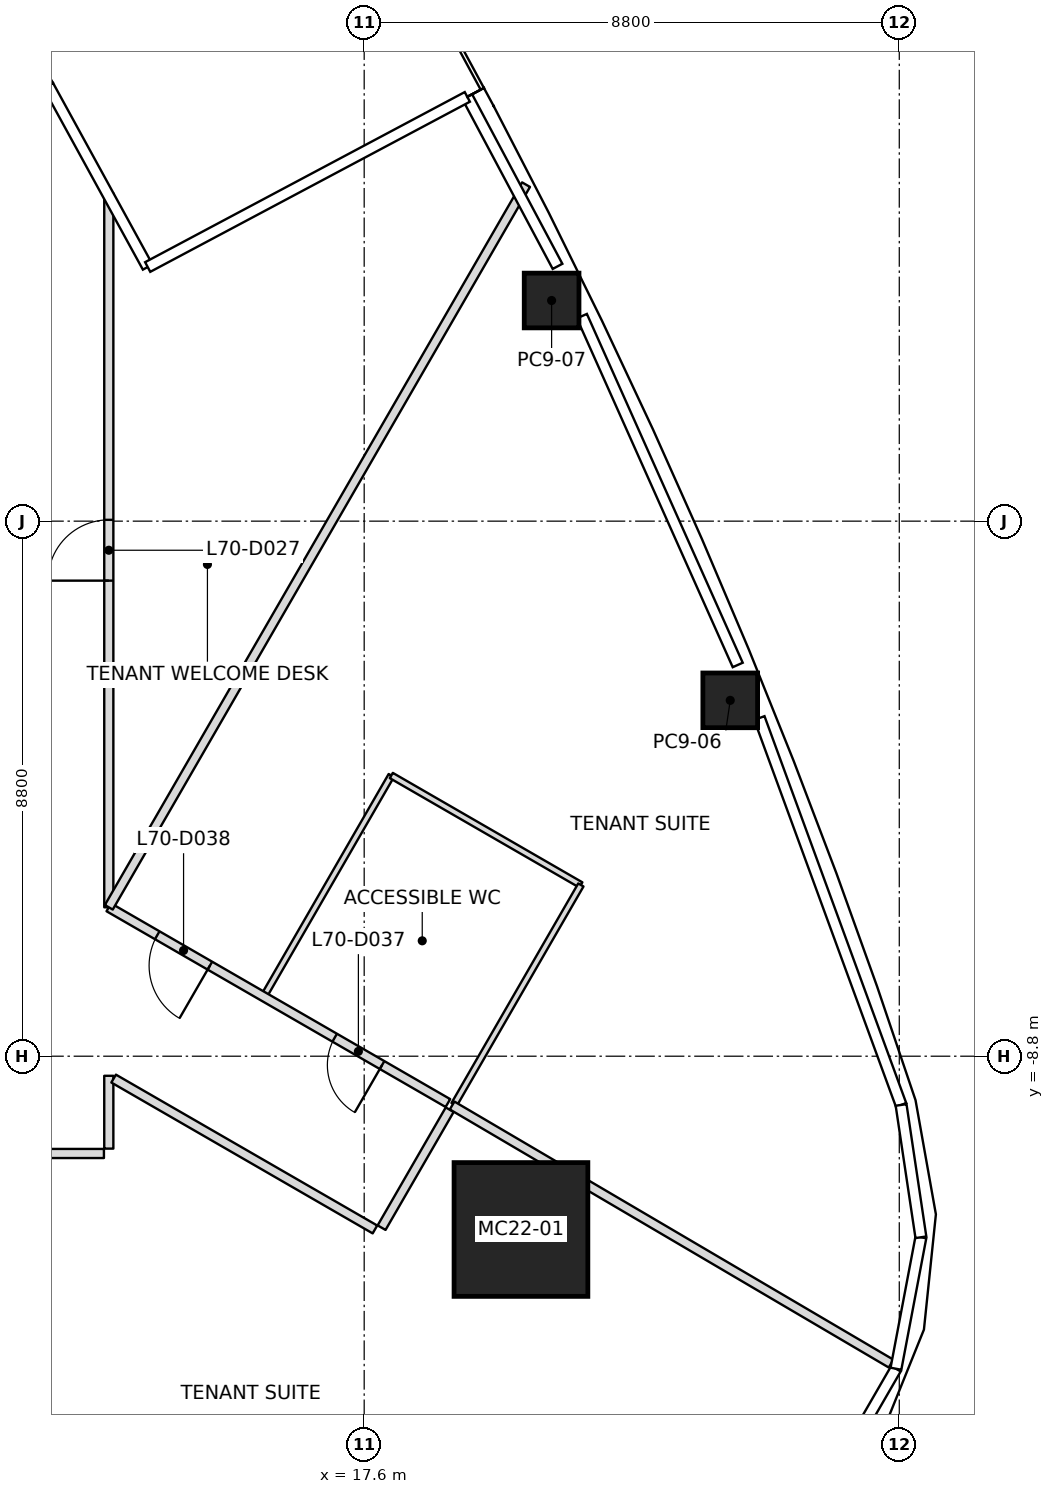
"""IFC4 building model, lengths in metres.
Left out: names, types, materials, properties, quantities, classifications, styles, units other than length and angle.
Written with IfcOpenShell. Run it as: python <this file> out.ifc"""

import sys

from ifc_helpers import new_model, si_unit, direction, frame, frame_2d, origin, origin_2d, place, context, subcontext, project, spatial, rectangle, extrude, element, fill, save


model = new_model("IFC4")
c1 = context("Model", 3, precision=1e-05, world=origin(), true_north=direction((0.0, 1.0)))
c2 = subcontext(c1, "Body", "Model", "MODEL_VIEW")
j1 = project(units=[si_unit("LENGTHUNIT", "METRE"), si_unit("PLANEANGLEUNIT", "RADIAN")], contexts=[c1])
p1 = place(None, origin())
s1 = spatial("IfcSite", under=j1, at=p1, CompositionType="ELEMENT")
p2 = place(p1, origin())
s2 = spatial("IfcBuilding", under=s1, at=p2, CompositionType="ELEMENT")
p3 = place(p2, frame((0.0, 0.0, 307.0)))
s3 = spatial("IfcBuildingStorey", under=s2, at=p3, CompositionType="ELEMENT", Elevation=307.0)
p4 = place(p3, frame((20.178, -11.65, 0.0), z_axis=(-0.027695790401, 0.015983033227, 0.999488612163), x_axis=(0.999616398022, 0.00044283261, 0.027692249912)))
e1 = element("IfcColumn", 1, at=p4, inside=s3, PredefinedType="COLUMN", context=c2, shape_type="SweptSolid", body=[
    extrude(rectangle(XDim=2.2, YDim=2.2, at=origin_2d()), origin(), (0.0, 0.0, 1.0), 4.002),
])
p5 = place(p3, frame((23.62, -2.948, 0.0), z_axis=(-0.017696547774, 0.0099466803, 0.999793926641), x_axis=(-0.376065101315, 0.926457269165, -0.015873499405)))
e2 = element("IfcColumn", 2, at=p5, inside=s3, PredefinedType="COLUMN", context=c2, shape_type="SweptSolid", body=[
    extrude(rectangle(XDim=0.9, YDim=0.9, at=origin_2d()), origin(), (0.0, 0.0, 1.0), 4.001),
])
p6 = place(p3, frame((20.682, 3.629, 0.0), z_axis=(-0.014036674448, 0.002013957638, 0.999899452818), x_axis=(-0.439063455836, 0.898420675548, -0.007973173653)))
e3 = element("IfcColumn", 3, at=p6, inside=s3, PredefinedType="COLUMN", context=c2, shape_type="SweptSolid", body=[
    extrude(rectangle(XDim=0.9, YDim=0.9, at=origin_2d()), origin(), (0.0, 0.0, 1.0), 4.0),
])
p7 = place(p3, frame((20.262, 5.534, 0.0), z_axis=(0.0, 0.0, 1.0), x_axis=(-0.500013496215, -0.866017611601, 0.0)))
e4 = element("IfcWall", 4, at=p7, inside=s3, PredefinedType="PARTITIONING", context=c2, shape_type="SweptSolid", body=[
    extrude(rectangle(XDim=13.724, YDim=0.15, at=frame_2d((6.862, 0.0))), origin(), (0.0, 0.0, 1.0), 3.234),
])
p8 = place(p3, frame((19.046, -9.611, 0.0), z_axis=(0.0, 0.0, 1.0), x_axis=(0.862012142354, -0.506887627029, 0.0)))
e5 = element("IfcWall", 5, at=p8, inside=s3, PredefinedType="PARTITIONING", context=c2, shape_type="SweptSolid", body=[
    extrude(rectangle(XDim=8.375, YDim=0.15, at=frame_2d((4.188, 0.0))), origin(), (0.0, 0.0, 1.0), 3.234),
])
p9 = place(p3, frame((1.2, -10.4, 0.0), z_axis=(0.0, 0.0, 1.0), x_axis=(1.0, 0.0, 0.0)))
e6 = element("IfcWall", 6, at=p9, inside=s3, PredefinedType="PARTITIONING", context=c2, shape_type="SweptSolid", body=[
    extrude(rectangle(XDim=12.12, YDim=0.15, at=frame_2d((6.06, 0.0))), origin(), (0.0, 0.0, 1.0), 3.393),
])
p10 = place(p9, frame((1.65, 0.0, 0.0)))
e7 = element("IfcOpeningElement", 7, at=p10, cuts=e6, PredefinedType="OPENING", context=c2, shape_type="SweptSolid", body=[
    extrude(rectangle(XDim=0.9, YDim=2.1, at=frame_2d((0.45, 1.05))), frame((0.0, 0.075, 0.0), z_axis=(0.0, -1.0, 0.0), x_axis=(1.0, 0.0, 0.0)), (0.0, 0.0, 1.0), 0.15),
])
p11 = place(p9, frame((7.75, 0.0, 0.0)))
e8 = element("IfcOpeningElement", 8, at=p11, cuts=e6, PredefinedType="OPENING", context=c2, shape_type="SweptSolid", body=[
    extrude(rectangle(XDim=1.0, YDim=2.1, at=frame_2d((0.5, 1.05))), frame((0.0, 0.075, 0.0), z_axis=(0.0, -1.0, 0.0), x_axis=(1.0, 0.0, 0.0)), (0.0, 0.0, 1.0), 0.15),
])
p12 = place(p3, frame((13.4, -10.32, 0.0), z_axis=(0.0, 0.0, 1.0), x_axis=(0.0, 1.0, 0.0)))
e9 = element("IfcWall", 9, at=p12, inside=s3, PredefinedType="PARTITIONING", context=c2, shape_type="SweptSolid", body=[
    extrude(rectangle(XDim=1.198, YDim=0.15, at=frame_2d((0.599, 0.0))), origin(), (0.0, 0.0, 1.0), 3.233),
])
p13 = place(p3, frame((13.479, -9.168, 0.0), z_axis=(0.0, 0.0, 1.0), x_axis=(0.866027465686, -0.499996428664, 0.0)))
e10 = element("IfcWall", 10, at=p13, inside=s3, PredefinedType="PARTITIONING", context=c2, shape_type="SweptSolid", body=[
    extrude(rectangle(XDim=4.962, YDim=0.15, at=frame_2d((2.481, 0.0))), origin(), (0.0, 0.0, 1.0), 3.233),
])
p14 = place(p3, frame((13.4, -6.351, 0.0), z_axis=(0.0, 0.0, 1.0), x_axis=(0.0, 1.0, 0.0)))
e11 = element("IfcWall", 11, at=p14, inside=s3, PredefinedType="PARTITIONING", context=c2, shape_type="SweptSolid", body=[
    extrude(rectangle(XDim=11.745, YDim=0.15, at=frame_2d((5.872, 0.0))), origin(), (0.0, 0.0, 1.0), 3.393),
])
p15 = place(p14, frame((5.372, 0.0, 0.0)))
e12 = element("IfcOpeningElement", 12, at=p15, cuts=e11, PredefinedType="OPENING", context=c2, shape_type="SweptSolid", body=[
    extrude(rectangle(XDim=1.0, YDim=2.1, at=frame_2d((0.5, 1.05))), frame((0.0, 0.075, 0.0), z_axis=(0.0, -1.0, 0.0), x_axis=(1.0, 0.0, 0.0)), (0.0, 0.0, 1.0), 0.15),
])
p16 = place(p3, frame((18.977, -9.571, 0.0), z_axis=(0.0, 0.0, 1.0), x_axis=(-0.866015754151, 0.500016713282, 0.0)))
e13 = element("IfcWall", 13, at=p16, inside=s3, PredefinedType="PARTITIONING", context=c2, shape_type="SweptSolid", body=[
    extrude(rectangle(XDim=6.44, YDim=0.15, at=frame_2d((3.22, 0.0))), origin(), (0.0, 0.0, 1.0), 3.317),
])
p17 = place(p16, frame((1.25, 0.0, 0.0)))
e14 = element("IfcOpeningElement", 14, at=p17, cuts=e13, PredefinedType="OPENING", context=c2, shape_type="SweptSolid", body=[
    extrude(rectangle(XDim=0.9, YDim=2.1, at=frame_2d((0.45, 1.05))), frame((0.0, 0.075, 0.0), z_axis=(0.0, -1.0, 0.0), x_axis=(1.0, 0.0, 0.0)), (0.0, 0.0, 1.0), 0.15),
])
p18 = place(p16, frame((4.52, 0.0, 0.0)))
e15 = element("IfcOpeningElement", 15, at=p18, cuts=e13, PredefinedType="OPENING", context=c2, shape_type="SweptSolid", body=[
    extrude(rectangle(XDim=1.0, YDim=2.1, at=frame_2d((0.5, 1.05))), frame((0.0, 0.075, 0.0), z_axis=(0.0, -1.0, 0.0), x_axis=(1.0, 0.0, 0.0)), (0.0, 0.0, 1.0), 0.15),
])
p19 = place(p3, frame((17.886, -11.62, 0.0), z_axis=(0.0, 0.0, 1.0), x_axis=(0.49994888933, 0.866054910533, 0.0)))
e16 = element("IfcWall", 16, at=p19, inside=s3, PredefinedType="PARTITIONING", context=c2, shape_type="SweptSolid", body=[
    extrude(rectangle(XDim=2.24, YDim=0.15, at=frame_2d((1.12, 0.0))), origin(), (0.0, 0.0, 1.0), 3.233),
])
p20 = place(p3, frame((15.961, -7.795, 0.0), z_axis=(0.0, 0.0, 1.0), x_axis=(0.499992746786, 0.866029591389, 0.0)))
e17 = element("IfcWall", 17, at=p20, inside=s3, PredefinedType="PARTITIONING", context=c2, shape_type="SweptSolid", body=[
    extrude(rectangle(XDim=4.17, YDim=0.1, at=frame_2d((2.085, 0.0))), origin(), (0.0, 0.0, 1.0), 3.45),
])
p21 = place(p3, frame((18.046, -4.183, 0.0), z_axis=(0.0, 0.0, 1.0), x_axis=(0.866018442252, -0.500012057535, 0.0)))
e18 = element("IfcWall", 18, at=p21, inside=s3, PredefinedType="PARTITIONING", context=c2, shape_type="SweptSolid", body=[
    extrude(rectangle(XDim=3.6, YDim=0.1, at=frame_2d((1.8, 0.0))), origin(), (0.0, 0.0, 1.0), 3.443),
])
p22 = place(p3, frame((21.164, -5.983, 0.0), z_axis=(0.0, 0.0, 1.0), x_axis=(-0.499992746786, -0.866029591389, 0.0)))
e19 = element("IfcWall", 19, at=p22, inside=s3, PredefinedType="PARTITIONING", context=c2, shape_type="SweptSolid", body=[
    extrude(rectangle(XDim=4.17, YDim=0.1, at=frame_2d((2.085, 0.0))), origin(), (0.0, 0.0, 1.0), 3.45),
])
p23 = place(p15, origin())
e20 = element("IfcDoor", 20, at=p23, inside=s3, OperationType="SINGLE_SWING_LEFT", PredefinedType="DOOR", context=c2, shape_type="SweptSolid", body=[
    extrude(rectangle(XDim=1.0, YDim=2.1, at=frame_2d((0.5, 1.05))), frame((0.0, 0.025, 0.0), z_axis=(0.0, -1.0, 0.0), x_axis=(1.0, 0.0, 0.0)), (0.0, 0.0, 1.0), 0.05),
])
fill(e12, e20)
p24 = place(p17, origin())
e21 = element("IfcDoor", 21, at=p24, inside=s3, OperationType="SINGLE_SWING_LEFT", PredefinedType="DOOR", context=c2, shape_type="SweptSolid", body=[
    extrude(rectangle(XDim=0.9, YDim=2.1, at=frame_2d((0.45, 1.05))), frame((0.0, 0.025, 0.0), z_axis=(0.0, -1.0, 0.0), x_axis=(1.0, 0.0, 0.0)), (0.0, 0.0, 1.0), 0.05),
])
fill(e14, e21)
p25 = place(p18, origin())
e22 = element("IfcDoor", 22, at=p25, inside=s3, OperationType="SINGLE_SWING_LEFT", PredefinedType="DOOR", context=c2, shape_type="SweptSolid", body=[
    extrude(rectangle(XDim=1.0, YDim=2.1, at=frame_2d((0.5, 1.05))), frame((0.0, 0.025, 0.0), z_axis=(0.0, -1.0, 0.0), x_axis=(1.0, 0.0, 0.0)), (0.0, 0.0, 1.0), 0.05),
])
fill(e15, e22)
save(model, sys.argv[1])
